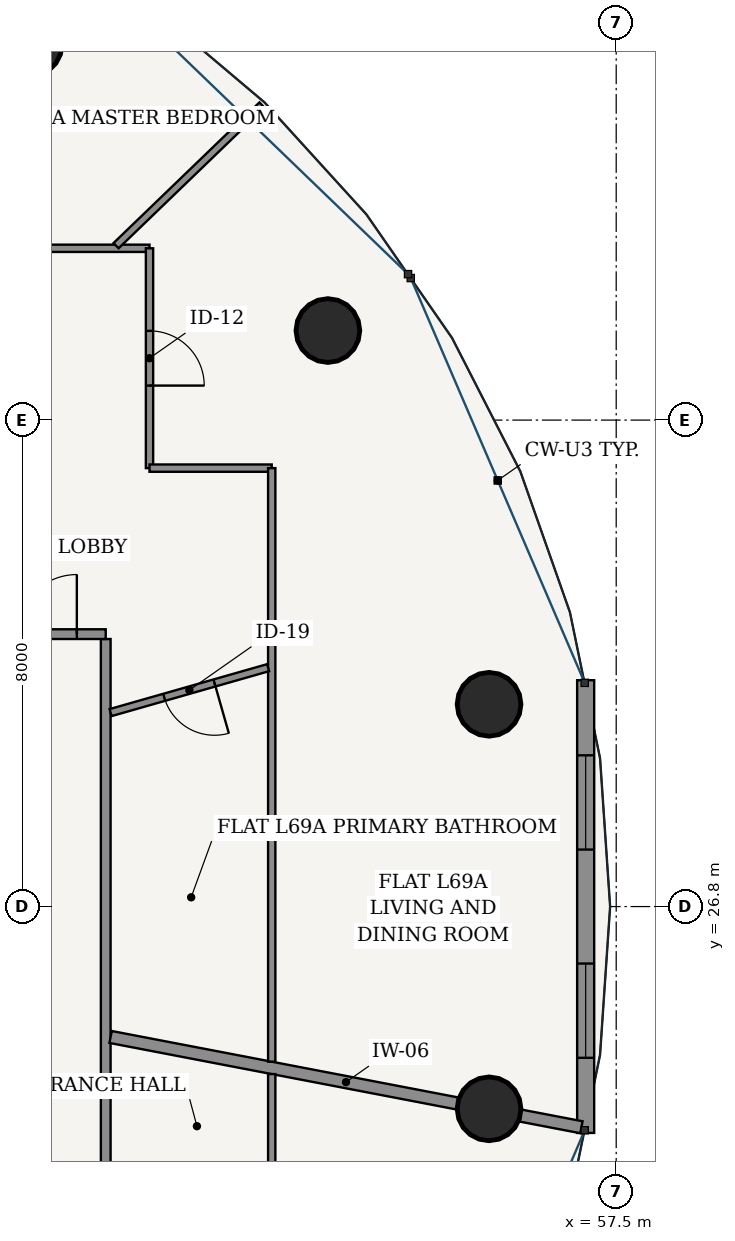
"""IFC4 building model, lengths in metres.
Left out: names, types, materials, properties, quantities, classifications, styles, units other than length and angle.
Written with IfcOpenShell. Run it as: python <this file> out.ifc"""

import sys

from ifc_helpers import new_model, si_unit, direction, frame, frame_2d, origin, origin_2d, place, context, subcontext, project, spatial, rectangle, hollow_circle, extrude, source, transform, mapped, element, fill, save


model = new_model("IFC4")
c1 = context("Model", 3, precision=1e-05, world=origin(), true_north=direction((-0.2419218956, 0.970295726276)))
c2 = subcontext(c1, "Body", "Model", "MODEL_VIEW")
j1 = project(units=[si_unit("LENGTHUNIT", "METRE"), si_unit("PLANEANGLEUNIT", "RADIAN")], contexts=[c1])
p1 = place(None, origin())
s1 = spatial("IfcSite", under=j1, at=p1, CompositionType="ELEMENT")
p2 = place(p1, origin())
s2 = spatial("IfcBuilding", under=s1, at=p2, CompositionType="ELEMENT")
p3 = place(p2, frame((0.0, 0.0, 263.2)))
s3 = spatial("IfcBuildingStorey", under=s2, at=p3, CompositionType="ELEMENT", Elevation=263.2)
for number, where, z_axis, x_axis in (
    (1, (55.409, 30.126, 0.0), (0.0, 0.0, 1.0), (1.0, 0.0, 0.0)),
    (2, (52.759, 36.272, 0.0), (0.0, 0.0, 1.0), (1.0, 0.0, 0.0)),
    (3, (47.861, 40.977, 0.0), (0.0, 0.0, 1.0), (1.0, 0.0, 0.0)),
    (4, (55.409, 23.474, 0.0), (0.0, 0.0, 1.0), (1.0, 0.0, 0.0)),
):
    element("IfcColumn", number, at=place(p3, frame(where, z_axis=z_axis, x_axis=x_axis)), inside=s3, PredefinedType="COLUMN", context=c2, shape_type="SweptSolid", body=[
        extrude(hollow_circle(Radius=0.525, WallThickness=0.035, at=origin_2d()), origin(), (0.0, 0.0, 1.0), 3.75),
    ])
p4 = place(p3, frame((56.998, 23.078, 0.0), z_axis=(0.0, 0.0, 1.0), x_axis=(0.0, 1.0, 0.0)))
e5 = element("IfcWall", 5, at=p4, inside=s3, PredefinedType="SOLIDWALL", context=c2, shape_type="SweptSolid", body=[
    extrude(rectangle(XDim=7.445, YDim=0.28, at=frame_2d((3.722, 0.0))), origin(), (0.0, 0.0, 1.0), 3.49),
])
p5 = place(p4, frame((1.235, 0.0, 0.85)))
e6 = element("IfcOpeningElement", 6, at=p5, cuts=e5, PredefinedType="OPENING", context=c2, shape_type="SweptSolid", body=[
    extrude(rectangle(XDim=1.55, YDim=1.95, at=frame_2d((0.775, 0.975))), frame((0.0, 0.15, 0.0), z_axis=(0.0, -1.0, 0.0), x_axis=(1.0, 0.0, 0.0)), (0.0, 0.0, 1.0), 0.3),
])
p6 = place(p4, frame((4.66, 0.0, 0.85)))
e7 = element("IfcOpeningElement", 7, at=p6, cuts=e5, PredefinedType="OPENING", context=c2, shape_type="SweptSolid", body=[
    extrude(rectangle(XDim=1.55, YDim=1.95, at=frame_2d((0.775, 0.975))), frame((0.0, 0.15, 0.0), z_axis=(0.0, -1.0, 0.0), x_axis=(1.0, 0.0, 0.0)), (0.0, 0.0, 1.0), 0.3),
])
p7 = place(p3, frame((49.105, 17.275, 0.0), z_axis=(0.0, 0.0, 1.0), x_axis=(0.0, 1.0, 0.0)))
e8 = element("IfcWall", 8, at=p7, inside=s3, PredefinedType="PARTITIONING", context=c2, shape_type="SweptSolid", body=[
    extrude(rectangle(XDim=13.925, YDim=0.16, at=frame_2d((6.962, 0.0))), origin(), (0.0, 0.0, 1.0), 3.015),
])
p8 = place(p7, frame((3.647, 0.0, 0.0)))
e9 = element("IfcOpeningElement", 9, at=p8, cuts=e8, PredefinedType="OPENING", context=c2, shape_type="SweptSolid", body=[
    extrude(rectangle(XDim=0.98, YDim=2.2, at=frame_2d((0.49, 1.1))), frame((0.0, 0.09, 0.0), z_axis=(0.0, -1.0, 0.0), x_axis=(1.0, 0.0, 0.0)), (0.0, 0.0, 1.0), 0.18),
])
p9 = place(p3, frame((47.175, 31.28, 0.0), z_axis=(0.0, 0.0, 1.0), x_axis=(1.0, 0.0, 0.0)))
e10 = element("IfcWall", 10, at=p9, inside=s3, PredefinedType="PARTITIONING", context=c2, shape_type="SweptSolid", body=[
    extrude(rectangle(XDim=1.93, YDim=0.16, at=frame_2d((0.965, 0.0))), origin(), (0.0, 0.0, 1.0), 3.49),
])
p10 = place(p9, frame((0.475, 0.0, 0.0)))
e11 = element("IfcOpeningElement", 11, at=p10, cuts=e10, PredefinedType="OPENING", context=c2, shape_type="SweptSolid", body=[
    extrude(rectangle(XDim=0.98, YDim=2.2, at=frame_2d((0.49, 1.1))), frame((0.0, 0.09, 0.0), z_axis=(0.0, -1.0, 0.0), x_axis=(1.0, 0.0, 0.0)), (0.0, 0.0, 1.0), 0.18),
])
p11 = place(p3, frame((49.185, 24.656, 0.0), z_axis=(0.0, 0.0, 1.0), x_axis=(0.982109889803, -0.188308694305, 0.0)))
e12 = element("IfcWall", 12, at=p11, inside=s3, PredefinedType="PARTITIONING", context=c2, shape_type="SweptSolid", body=[
    extrude(rectangle(XDim=7.884, YDim=0.2, at=frame_2d((3.942, 0.0))), origin(), (0.0, 0.0, 1.0), 3.015),
])
p12 = place(p3, frame((26.175, 37.625, 0.0), z_axis=(0.0, 0.0, 1.0), x_axis=(1.0, 0.0, 0.0)))
e13 = element("IfcWall", 13, at=p12, inside=s3, PredefinedType="PARTITIONING", context=c2, shape_type="SweptSolid", body=[
    extrude(rectangle(XDim=23.65, YDim=0.12, at=frame_2d((11.825, 0.0))), origin(), (0.0, 0.0, 1.0), 3.015),
])
p13 = place(p12, frame((14.733, 0.0, 0.0)))
e14 = element("IfcOpeningElement", 14, at=p13, cuts=e13, PredefinedType="OPENING", context=c2, shape_type="SweptSolid", body=[
    extrude(rectangle(XDim=0.9, YDim=2.15, at=frame_2d((0.45, 1.075))), frame((0.0, 0.07, 0.0), z_axis=(0.0, -1.0, 0.0), x_axis=(1.0, 0.0, 0.0)), (0.0, 0.0, 1.0), 0.14),
])
p14 = place(p12, frame((11.279, 0.0, 0.0)))
e15 = element("IfcOpeningElement", 15, at=p14, cuts=e13, PredefinedType="OPENING", context=c2, shape_type="SweptSolid", body=[
    extrude(rectangle(XDim=0.9, YDim=2.15, at=frame_2d((0.45, 1.075))), frame((0.0, 0.07, 0.0), z_axis=(0.0, -1.0, 0.0), x_axis=(1.0, 0.0, 0.0)), (0.0, 0.0, 1.0), 0.14),
])
p15 = place(p12, frame((2.678, 0.0, 0.0)))
e16 = element("IfcOpeningElement", 16, at=p15, cuts=e13, PredefinedType="OPENING", context=c2, shape_type="SweptSolid", body=[
    extrude(rectangle(XDim=0.9, YDim=2.15, at=frame_2d((0.45, 1.075))), frame((0.0, 0.07, 0.0), z_axis=(0.0, -1.0, 0.0), x_axis=(1.0, 0.0, 0.0)), (0.0, 0.0, 1.0), 0.14),
])
p16 = place(p3, frame((49.825, 37.625, 0.0), z_axis=(0.0, 0.0, 1.0), x_axis=(0.0, -1.0, 0.0)))
e17 = element("IfcWall", 17, at=p16, inside=s3, PredefinedType="PARTITIONING", context=c2, shape_type="SweptSolid", body=[
    extrude(rectangle(XDim=3.615, YDim=0.12, at=frame_2d((1.808, 0.0))), origin(), (0.0, 0.0, 1.0), 3.015),
])
p17 = place(p16, frame((1.357, 0.0, 0.0)))
e18 = element("IfcOpeningElement", 18, at=p17, cuts=e17, PredefinedType="OPENING", context=c2, shape_type="SweptSolid", body=[
    extrude(rectangle(XDim=0.9, YDim=2.15, at=frame_2d((0.45, 1.075))), frame((0.0, 0.07, 0.0), z_axis=(0.0, -1.0, 0.0), x_axis=(1.0, 0.0, 0.0)), (0.0, 0.0, 1.0), 0.14),
])
p18 = place(p3, frame((49.825, 34.01, 0.0), z_axis=(0.0, 0.0, 1.0), x_axis=(1.0, 0.0, 0.0)))
e19 = element("IfcWall", 19, at=p18, inside=s3, PredefinedType="PARTITIONING", context=c2, shape_type="SweptSolid", body=[
    extrude(rectangle(XDim=2.01, YDim=0.12, at=frame_2d((1.005, 0.0))), origin(), (0.0, 0.0, 1.0), 3.209),
])
p19 = place(p3, frame((51.835, 34.01, 0.0), z_axis=(0.0, 0.0, 1.0), x_axis=(0.0, -1.0, 0.0)))
e20 = element("IfcWall", 20, at=p19, inside=s3, PredefinedType="PARTITIONING", context=c2, shape_type="SweptSolid", body=[
    extrude(rectangle(XDim=9.761, YDim=0.12, at=frame_2d((4.88, 0.0))), origin(), (0.0, 0.0, 1.0), 3.015),
])
p20 = place(p3, frame((49.275, 37.668, 0.0), z_axis=(0.0, 0.0, 1.0), x_axis=(0.719954096891, 0.694021684366, 0.0)))
e21 = element("IfcWall", 21, at=p20, inside=s3, PredefinedType="PARTITIONING", context=c2, shape_type="SweptSolid", body=[
    extrude(rectangle(XDim=3.333, YDim=0.12, at=frame_2d((1.667, 0.0))), origin(), (0.0, 0.0, 1.0), 3.121),
])
p21 = place(p3, frame((49.185, 29.99, 0.0), z_axis=(0.0, 0.0, 1.0), x_axis=(0.961653809431, 0.274266204273, 0.0)))
e22 = element("IfcWall", 22, at=p21, inside=s3, PredefinedType="PARTITIONING", context=c2, shape_type="SweptSolid", body=[
    extrude(rectangle(XDim=2.694, YDim=0.12, at=frame_2d((1.347, 0.0))), origin(), (0.0, 0.0, 1.0), 3.209),
])
p22 = place(p21, frame((0.917, 0.0, 0.0)))
e23 = element("IfcOpeningElement", 23, at=p22, cuts=e22, PredefinedType="OPENING", context=c2, shape_type="SweptSolid", body=[
    extrude(rectangle(XDim=0.86, YDim=2.15, at=frame_2d((0.43, 1.075))), frame((0.0, 0.07, 0.0), z_axis=(0.0, -1.0, 0.0), x_axis=(1.0, 0.0, 0.0)), (0.0, 0.0, 1.0), 0.14),
])
p23 = place(p3, frame((51.835, 24.045, 0.0), z_axis=(0.0, 0.0, 1.0), x_axis=(0.0, -1.0, 0.0)))
e24 = element("IfcWall", 24, at=p23, inside=s3, PredefinedType="PARTITIONING", context=c2, shape_type="SweptSolid", body=[
    extrude(rectangle(XDim=9.58, YDim=0.12, at=frame_2d((4.79, 0.0))), origin(), (0.0, 0.0, 1.0), 3.015),
])
p24 = place(p23, frame((2.771, 0.0, 0.0)))
e25 = element("IfcOpeningElement", 25, at=p24, cuts=e24, PredefinedType="OPENING", context=c2, shape_type="SweptSolid", body=[
    extrude(rectangle(XDim=0.9, YDim=2.15, at=frame_2d((0.45, 1.075))), frame((0.0, 0.07, 0.0), z_axis=(0.0, -1.0, 0.0), x_axis=(1.0, 0.0, 0.0)), (0.0, 0.0, 1.0), 0.14),
])
p25 = place(p23, frame((8.073, 0.0, 0.0)))
e26 = element("IfcOpeningElement", 26, at=p25, cuts=e24, PredefinedType="OPENING", context=c2, shape_type="SweptSolid", body=[
    extrude(rectangle(XDim=0.9, YDim=2.15, at=frame_2d((0.45, 1.075))), frame((0.0, 0.07, 0.0), z_axis=(0.0, -1.0, 0.0), x_axis=(1.0, 0.0, 0.0)), (0.0, 0.0, 1.0), 0.14),
])
m1 = source(origin(), c2, "Body", "SweptSolid", [
    extrude(rectangle(XDim=1.55, YDim=1.95, at=frame_2d((0.775, 0.975))), frame((0.0, 0.03, 0.0), z_axis=(0.0, -1.0, 0.0), x_axis=(1.0, 0.0, 0.0)), (0.0, 0.0, 1.0), 0.06),
])
p26 = place(p5, origin())
e27 = element("IfcWindow", 27, at=p26, inside=s3, PartitioningType="SINGLE_PANEL", PredefinedType="WINDOW", context=c2, shape_type="MappedRepresentation", body=[
    mapped(m1, transform((0.0, 0.0, 0.0), scale=1.0)),
])
fill(e6, e27)
p27 = place(p6, origin())
e28 = element("IfcWindow", 28, at=p27, inside=s3, PartitioningType="SINGLE_PANEL", PredefinedType="WINDOW", context=c2, shape_type="MappedRepresentation", body=[
    mapped(m1, transform((0.0, 0.0, 0.0), scale=1.0)),
])
fill(e7, e28)
m2 = source(origin(), c2, "Body", "SweptSolid", [
    extrude(rectangle(XDim=0.98, YDim=2.2, at=frame_2d((0.49, 1.1))), frame((0.0, 0.025, 0.0), z_axis=(0.0, -1.0, 0.0), x_axis=(1.0, 0.0, 0.0)), (0.0, 0.0, 1.0), 0.05),
])
p28 = place(p10, origin())
e29 = element("IfcDoor", 29, at=p28, inside=s3, OperationType="SINGLE_SWING_RIGHT", PredefinedType="DOOR", context=c2, shape_type="MappedRepresentation", body=[
    mapped(m2, transform((0.0, 0.0, 0.0), scale=1.0)),
])
fill(e11, e29)
m3 = source(origin(), c2, "Body", "SweptSolid", [
    extrude(rectangle(XDim=0.86, YDim=2.15, at=frame_2d((0.43, 1.075))), frame((0.0, 0.025, 0.0), z_axis=(0.0, -1.0, 0.0), x_axis=(1.0, 0.0, 0.0)), (0.0, 0.0, 1.0), 0.05),
])
p29 = place(p22, frame((0.86, 0.0, 0.0), z_axis=(0.0, 0.0, 1.0), x_axis=(-1.0, 0.0, 0.0)))
e30 = element("IfcDoor", 30, at=p29, inside=s3, OperationType="SINGLE_SWING_LEFT", PredefinedType="DOOR", context=c2, shape_type="MappedRepresentation", body=[
    mapped(m3, transform((0.0, 0.0, 0.0), scale=1.0)),
])
fill(e23, e30)
m4 = source(origin(), c2, "Body", "SweptSolid", [
    extrude(rectangle(XDim=0.9, YDim=2.15, at=frame_2d((0.45, 1.075))), frame((0.0, 0.025, 0.0), z_axis=(0.0, -1.0, 0.0), x_axis=(1.0, 0.0, 0.0)), (0.0, 0.0, 1.0), 0.05),
])
p30 = place(p17, origin())
e31 = element("IfcDoor", 31, at=p30, inside=s3, OperationType="SINGLE_SWING_RIGHT", PredefinedType="DOOR", context=c2, shape_type="MappedRepresentation", body=[
    mapped(m4, transform((0.0, 0.0, 0.0), scale=1.0)),
])
fill(e18, e31)
save(model, sys.argv[1])
